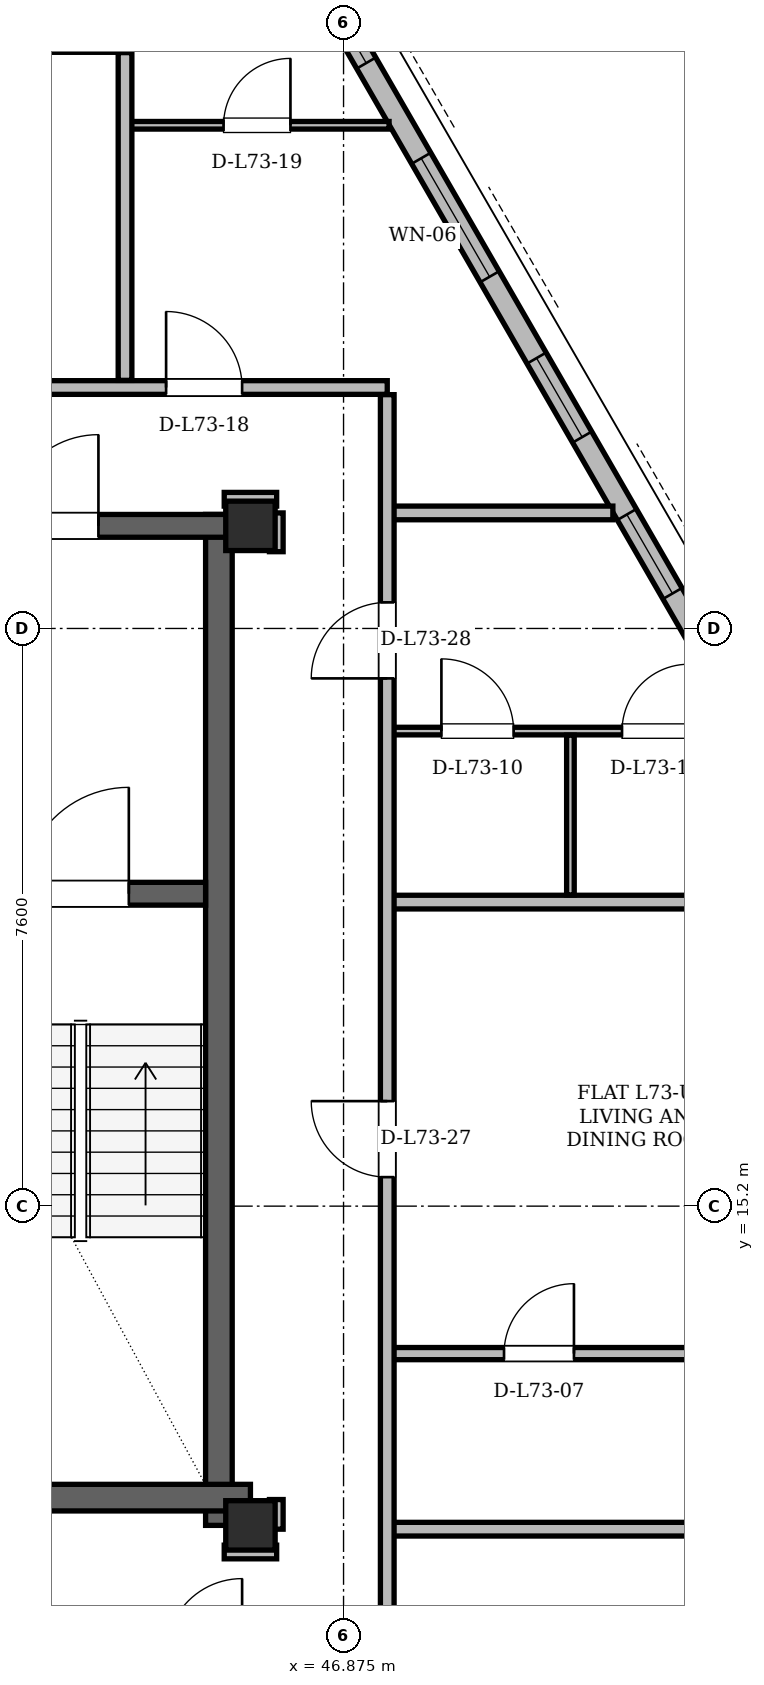
"""IFC4 building model, lengths in metres.
Left out: names, types, materials, properties, quantities, classifications, styles, units other than length and angle.
Written with IfcOpenShell. Run it as: python <this file> out.ifc"""

import sys

from ifc_helpers import new_model, si_unit, direction, frame, frame_2d, origin, origin_2d, place, context, subcontext, project, spatial, rectangle, hollow_rectangle, extrude, element, fill, save


model = new_model("IFC4")
c1 = context("Model", 3, precision=1e-05, world=origin(), true_north=direction((0.0, 1.0)))
c2 = subcontext(c1, "Body", "Model", "MODEL_VIEW")
j1 = project(units=[si_unit("LENGTHUNIT", "METRE"), si_unit("PLANEANGLEUNIT", "RADIAN")], contexts=[c1])
p1 = place(None, origin())
s1 = spatial("IfcSite", under=j1, at=p1, CompositionType="ELEMENT")
p2 = place(p1, origin())
s2 = spatial("IfcBuilding", under=s1, at=p2, CompositionType="ELEMENT")
p3 = place(p2, frame((0.0, 0.0, 277.2)))
s3 = spatial("IfcBuildingStorey", under=s2, at=p3, CompositionType="ELEMENT", Elevation=277.2)
for number, where, z_axis, x_axis in (
    (1, (45.65, 11.0, 0.0), (0.0, 0.0, 1.0), (1.0, 0.0, 0.0)),
    (2, (45.65, 24.15, 0.0), (0.0, 0.0, 1.0), (1.0, 0.0, 0.0)),
):
    element("IfcColumn", number, at=place(p3, frame(where, z_axis=z_axis, x_axis=x_axis)), inside=s3, PredefinedType="COLUMN", context=c2, shape_type="SweptSolid", body=[
        extrude(hollow_rectangle(XDim=0.65, YDim=0.65, WallThickness=0.05, at=origin_2d()), origin(), (0.0, 0.0, 1.0), 3.9),
    ])
p4 = place(p3, frame((45.235, 11.0, 0.0), z_axis=(0.0, 0.0, 1.0), x_axis=(0.0, 1.0, 0.0)))
e3 = element("IfcWall", 3, at=p4, inside=s3, PredefinedType="SHEAR", context=c2, shape_type="SweptSolid", body=[
    extrude(rectangle(XDim=13.3, YDim=0.35, at=frame_2d((6.65, 0.0))), origin(), (0.0, 0.0, 1.0), 3.68),
])
p5 = place(p3, frame((38.55, 11.365, 0.0), z_axis=(0.0, 0.0, 1.0), x_axis=(1.0, 0.0, 0.0)))
e4 = element("IfcWall", 4, at=p5, inside=s3, PredefinedType="SHEAR", context=c2, shape_type="SweptSolid", body=[
    extrude(rectangle(XDim=7.1, YDim=0.35, at=frame_2d((3.55, 0.0))), origin(), (0.0, 0.0, 1.0), 3.68),
])
p6 = place(p3, frame((29.65, 24.15, 0.0), z_axis=(0.0, 0.0, 1.0), x_axis=(1.0, 0.0, 0.0)))
e5 = element("IfcWall", 5, at=p6, inside=s3, PredefinedType="SHEAR", context=c2, shape_type="SweptSolid", body=[
    extrude(rectangle(XDim=15.7, YDim=0.3, at=frame_2d((7.85, 0.0))), origin(), (0.0, 0.0, 1.0), 3.68),
])
p7 = place(p6, frame((1.7, 0.0, 0.0)))
e6 = element("IfcOpeningElement", 6, at=p7, cuts=e5, PredefinedType="OPENING", context=c2, shape_type="SweptSolid", body=[
    extrude(rectangle(XDim=1.2, YDim=2.2, at=frame_2d((0.6, 1.1))), frame((0.0, 0.15, 0.0), z_axis=(0.0, -1.0, 0.0), x_axis=(1.0, 0.0, 0.0)), (0.0, 0.0, 1.0), 0.3),
])
p8 = place(p6, frame((12.8, 0.0, 0.0)))
e7 = element("IfcOpeningElement", 7, at=p8, cuts=e5, PredefinedType="OPENING", context=c2, shape_type="SweptSolid", body=[
    extrude(rectangle(XDim=1.2, YDim=2.2, at=frame_2d((0.6, 1.1))), frame((0.0, 0.15, 0.0), z_axis=(0.0, -1.0, 0.0), x_axis=(1.0, 0.0, 0.0)), (0.0, 0.0, 1.0), 0.3),
])
p9 = place(p6, frame((6.55, 0.0, 0.0)))
e8 = element("IfcOpeningElement", 8, at=p9, cuts=e5, PredefinedType="OPENING", context=c2, shape_type="SweptSolid", body=[
    extrude(rectangle(XDim=0.9, YDim=2.05, at=frame_2d((0.45, 1.025))), frame((0.0, 0.15, 0.0), z_axis=(0.0, -1.0, 0.0), x_axis=(1.0, 0.0, 0.0)), (0.0, 0.0, 1.0), 0.3),
])
p10 = place(p6, frame((8.45, 0.0, 0.0)))
e9 = element("IfcOpeningElement", 9, at=p10, cuts=e5, PredefinedType="OPENING", context=c2, shape_type="SweptSolid", body=[
    extrude(rectangle(XDim=0.9, YDim=2.05, at=frame_2d((0.45, 1.025))), frame((0.0, 0.15, 0.0), z_axis=(0.0, -1.0, 0.0), x_axis=(1.0, 0.0, 0.0)), (0.0, 0.0, 1.0), 0.3),
])
p11 = place(p3, frame((41.05, 19.31, 0.0), z_axis=(0.0, 0.0, 1.0), x_axis=(1.0, 0.0, 0.0)))
e10 = element("IfcWall", 10, at=p11, inside=s3, PredefinedType="SHEAR", context=c2, shape_type="SweptSolid", body=[
    extrude(rectangle(XDim=4.01, YDim=0.3, at=frame_2d((2.005, 0.0))), origin(), (0.0, 0.0, 1.0), 3.68),
])
p12 = place(p11, frame((1.6, 0.0, 0.0)))
e11 = element("IfcOpeningElement", 11, at=p12, cuts=e10, PredefinedType="OPENING", context=c2, shape_type="SweptSolid", body=[
    extrude(rectangle(XDim=1.4, YDim=2.2, at=frame_2d((0.7, 1.1))), frame((0.0, 0.15, 0.0), z_axis=(0.0, -1.0, 0.0), x_axis=(1.0, 0.0, 0.0)), (0.0, 0.0, 1.0), 0.3),
])
p13 = place(p3, frame((58.493, 10.633, 0.0), z_axis=(0.0, 0.0, 1.0), x_axis=(-0.499998095684, 0.866026503239, 0.0)))
e12 = element("IfcWall", 12, at=p13, inside=s3, PredefinedType="SOLIDWALL", context=c2, shape_type="SweptSolid", body=[
    extrude(rectangle(XDim=37.389, YDim=0.29, at=frame_2d((18.695, 0.0))), origin(), (0.0, 0.0, 1.0), 3.058),
])
p14 = place(p13, frame((8.034, 0.0, 0.0)))
e13 = element("IfcOpeningElement", 13, at=p14, cuts=e12, PredefinedType="OPENING", context=c2, shape_type="SweptSolid", body=[
    extrude(rectangle(XDim=1.5, YDim=2.2, at=frame_2d((0.75, 1.1))), frame((0.0, 0.145, 0.0), z_axis=(0.0, -1.0, 0.0), x_axis=(1.0, 0.0, 0.0)), (0.0, 0.0, 1.0), 0.29),
])
p15 = place(p13, frame((29.1, 0.0, 0.0)))
e14 = element("IfcOpeningElement", 14, at=p15, cuts=e12, PredefinedType="OPENING", context=c2, shape_type="SweptSolid", body=[
    extrude(rectangle(XDim=1.5, YDim=2.2, at=frame_2d((0.75, 1.1))), frame((0.0, 0.145, 0.0), z_axis=(0.0, -1.0, 0.0), x_axis=(1.0, 0.0, 0.0)), (0.0, 0.0, 1.0), 0.29),
])
p16 = place(p13, frame((3.531, 0.0, 0.85)))
e15 = element("IfcOpeningElement", 15, at=p16, cuts=e12, PredefinedType="OPENING", context=c2, shape_type="SweptSolid", body=[
    extrude(rectangle(XDim=1.2, YDim=1.48, at=frame_2d((0.6, 0.74))), frame((0.0, 0.145, 0.0), z_axis=(0.0, -1.0, 0.0), x_axis=(1.0, 0.0, 0.0)), (0.0, 0.0, 1.0), 0.29),
])
p17 = place(p13, frame((1.055, 0.0, 0.85)))
e16 = element("IfcOpeningElement", 16, at=p17, cuts=e12, PredefinedType="OPENING", context=c2, shape_type="SweptSolid", body=[
    extrude(rectangle(XDim=1.2, YDim=1.48, at=frame_2d((0.6, 0.74))), frame((0.0, 0.145, 0.0), z_axis=(0.0, -1.0, 0.0), x_axis=(1.0, 0.0, 0.0)), (0.0, 0.0, 1.0), 0.29),
])
p18 = place(p13, frame((35.336, 0.0, 0.85)))
e17 = element("IfcOpeningElement", 17, at=p18, cuts=e12, PredefinedType="OPENING", context=c2, shape_type="SweptSolid", body=[
    extrude(rectangle(XDim=1.2, YDim=1.48, at=frame_2d((0.6, 0.74))), frame((0.0, 0.145, 0.0), z_axis=(0.0, -1.0, 0.0), x_axis=(1.0, 0.0, 0.0)), (0.0, 0.0, 1.0), 0.29),
])
p19 = place(p13, frame((16.956, 0.0, 0.85)))
e18 = element("IfcOpeningElement", 18, at=p19, cuts=e12, PredefinedType="OPENING", context=c2, shape_type="SweptSolid", body=[
    extrude(rectangle(XDim=1.2, YDim=1.48, at=frame_2d((0.6, 0.74))), frame((0.0, 0.145, 0.0), z_axis=(0.0, -1.0, 0.0), x_axis=(1.0, 0.0, 0.0)), (0.0, 0.0, 1.0), 0.29),
])
p20 = place(p13, frame((19.392, 0.0, 0.85)))
e19 = element("IfcOpeningElement", 19, at=p20, cuts=e12, PredefinedType="OPENING", context=c2, shape_type="SweptSolid", body=[
    extrude(rectangle(XDim=1.8, YDim=1.75, at=frame_2d((0.9, 0.875))), frame((0.0, 0.145, 0.0), z_axis=(0.0, -1.0, 0.0), x_axis=(1.0, 0.0, 0.0)), (0.0, 0.0, 1.0), 0.29),
])
p21 = place(p13, frame((22.638, 0.0, 0.85)))
e20 = element("IfcOpeningElement", 20, at=p21, cuts=e12, PredefinedType="OPENING", context=c2, shape_type="SweptSolid", body=[
    extrude(rectangle(XDim=2.2, YDim=1.85, at=frame_2d((1.1, 0.925))), frame((0.0, 0.145, 0.0), z_axis=(0.0, -1.0, 0.0), x_axis=(1.0, 0.0, 0.0)), (0.0, 0.0, 1.0), 0.29),
])
p22 = place(p13, frame((14.58, 0.0, 0.85)))
e21 = element("IfcOpeningElement", 21, at=p22, cuts=e12, PredefinedType="OPENING", context=c2, shape_type="SweptSolid", body=[
    extrude(rectangle(XDim=1.2, YDim=1.48, at=frame_2d((0.6, 0.74))), frame((0.0, 0.145, 0.0), z_axis=(0.0, -1.0, 0.0), x_axis=(1.0, 0.0, 0.0)), (0.0, 0.0, 1.0), 0.29),
])
p23 = place(p3, frame((45.305, 10.65, 0.0), z_axis=(0.0, 0.0, 1.0), x_axis=(1.0, 0.0, 0.0)))
e22 = element("IfcWall", 22, at=p23, inside=s3, PredefinedType="PARTITIONING", context=c2, shape_type="SweptSolid", body=[
    extrude(rectangle(XDim=0.69, YDim=0.18, at=frame_2d((0.345, 0.0))), origin(), (0.0, 0.0, 1.0), 3.68),
])
p24 = place(p3, frame((47.45, 10.95, 0.0), z_axis=(0.0, 0.0, 1.0), x_axis=(1.0, 0.0, 0.0)))
e23 = element("IfcWall", 23, at=p24, inside=s3, PredefinedType="PARTITIONING", context=c2, shape_type="SweptSolid", body=[
    extrude(rectangle(XDim=10.688, YDim=0.18, at=frame_2d((5.344, 0.0))), origin(), (0.0, 0.0, 1.0), 3.266),
])
p25 = place(p3, frame((47.4, 13.26, 0.0), z_axis=(0.0, 0.0, 1.0), x_axis=(1.0, 0.0, 0.0)))
e24 = element("IfcWall", 24, at=p25, inside=s3, PredefinedType="PARTITIONING", context=c2, shape_type="SweptSolid", body=[
    extrude(rectangle(XDim=9.404, YDim=0.16, at=frame_2d((4.702, 0.0))), origin(), (0.0, 0.0, 1.0), 3.68),
])
p26 = place(p25, frame((1.586, 0.0, 0.0)))
e25 = element("IfcOpeningElement", 25, at=p26, cuts=e24, PredefinedType="OPENING", context=c2, shape_type="SweptSolid", body=[
    extrude(rectangle(XDim=0.92, YDim=2.12, at=frame_2d((0.46, 1.06))), frame((0.0, 0.08, 0.0), z_axis=(0.0, -1.0, 0.0), x_axis=(1.0, 0.0, 0.0)), (0.0, 0.0, 1.0), 0.16),
])
p27 = place(p25, frame((5.123, 0.0, 0.0)))
e26 = element("IfcOpeningElement", 26, at=p27, cuts=e24, PredefinedType="OPENING", context=c2, shape_type="SweptSolid", body=[
    extrude(rectangle(XDim=0.95, YDim=2.1, at=frame_2d((0.475, 1.05))), frame((0.0, 0.08, 0.0), z_axis=(0.0, -1.0, 0.0), x_axis=(1.0, 0.0, 0.0)), (0.0, 0.0, 1.0), 0.16),
])
p28 = place(p25, frame((7.838, 0.0, 0.0)))
e27 = element("IfcOpeningElement", 27, at=p28, cuts=e24, PredefinedType="OPENING", context=c2, shape_type="SweptSolid", body=[
    extrude(rectangle(XDim=0.88, YDim=2.08, at=frame_2d((0.44, 1.04))), frame((0.0, 0.08, 0.0), z_axis=(0.0, -1.0, 0.0), x_axis=(1.0, 0.0, 0.0)), (0.0, 0.0, 1.0), 0.16),
])
p29 = place(p3, frame((47.45, 19.2, 0.0), z_axis=(0.0, 0.0, 1.0), x_axis=(1.0, 0.0, 0.0)))
e28 = element("IfcWall", 28, at=p29, inside=s3, PredefinedType="PARTITIONING", context=c2, shape_type="SweptSolid", body=[
    extrude(rectangle(XDim=5.925, YDim=0.18, at=frame_2d((2.962, 0.0))), origin(), (0.0, 0.0, 1.0), 3.68),
])
p30 = place(p3, frame((47.4, 21.45, 0.0), z_axis=(0.0, 0.0, 1.0), x_axis=(1.0, 0.0, 0.0)))
e29 = element("IfcWall", 29, at=p30, inside=s3, PredefinedType="PARTITIONING", context=c2, shape_type="SweptSolid", body=[
    extrude(rectangle(XDim=4.676, YDim=0.1, at=frame_2d((2.338, 0.0))), origin(), (0.0, 0.0, 1.0), 3.68),
])
p31 = place(p30, frame((0.763, 0.0, 0.0)))
e30 = element("IfcOpeningElement", 30, at=p31, cuts=e29, PredefinedType="OPENING", context=c2, shape_type="SweptSolid", body=[
    extrude(rectangle(XDim=0.95, YDim=2.1, at=frame_2d((0.475, 1.05))), frame((0.0, 0.05, 0.0), z_axis=(0.0, -1.0, 0.0), x_axis=(1.0, 0.0, 0.0)), (0.0, 0.0, 1.0), 0.1),
])
p32 = place(p30, frame((3.139, 0.0, 0.0)))
e31 = element("IfcOpeningElement", 31, at=p32, cuts=e29, PredefinedType="OPENING", context=c2, shape_type="SweptSolid", body=[
    extrude(rectangle(XDim=0.88, YDim=2.08, at=frame_2d((0.44, 1.04))), frame((0.0, 0.05, 0.0), z_axis=(0.0, -1.0, 0.0), x_axis=(1.0, 0.0, 0.0)), (0.0, 0.0, 1.0), 0.1),
])
p33 = place(p3, frame((47.45, 24.32, 0.0), z_axis=(0.0, 0.0, 1.0), x_axis=(1.0, 0.0, 0.0)))
e32 = element("IfcWall", 32, at=p33, inside=s3, PredefinedType="PARTITIONING", context=c2, shape_type="SweptSolid", body=[
    extrude(rectangle(XDim=2.969, YDim=0.18, at=frame_2d((1.484, 0.0))), origin(), (0.0, 0.0, 1.0), 3.68),
])
p34 = place(p3, frame((45.305, 24.5, 0.0), z_axis=(0.0, 0.0, 1.0), x_axis=(1.0, 0.0, 0.0)))
e33 = element("IfcWall", 33, at=p34, inside=s3, PredefinedType="PARTITIONING", context=c2, shape_type="SweptSolid", body=[
    extrude(rectangle(XDim=0.69, YDim=0.18, at=frame_2d((0.345, 0.0))), origin(), (0.0, 0.0, 1.0), 3.266),
])
p35 = place(p3, frame((25.6, 25.97, 0.0), z_axis=(0.0, 0.0, 1.0), x_axis=(1.0, 0.0, 0.0)))
e34 = element("IfcWall", 34, at=p35, inside=s3, PredefinedType="PARTITIONING", context=c2, shape_type="SweptSolid", body=[
    extrude(rectangle(XDim=21.85, YDim=0.18, at=frame_2d((10.925, 0.0))), origin(), (0.0, 0.0, 1.0), 3.266),
])
p36 = place(p35, frame((7.454, 0.0, 0.0)))
e35 = element("IfcOpeningElement", 35, at=p36, cuts=e34, PredefinedType="OPENING", context=c2, shape_type="SweptSolid", body=[
    extrude(rectangle(XDim=1.0, YDim=2.18, at=frame_2d((0.5, 1.09))), frame((0.0, 0.09, 0.0), z_axis=(0.0, -1.0, 0.0), x_axis=(1.0, 0.0, 0.0)), (0.0, 0.0, 1.0), 0.18),
])
p37 = place(p35, frame((15.35, 0.0, 0.0)))
e36 = element("IfcOpeningElement", 36, at=p37, cuts=e34, PredefinedType="OPENING", context=c2, shape_type="SweptSolid", body=[
    extrude(rectangle(XDim=1.3, YDim=2.2, at=frame_2d((0.65, 1.1))), frame((0.0, 0.09, 0.0), z_axis=(0.0, -1.0, 0.0), x_axis=(1.0, 0.0, 0.0)), (0.0, 0.0, 1.0), 0.18),
])
p38 = place(p35, frame((18.94, 0.0, 0.0)))
e37 = element("IfcOpeningElement", 37, at=p38, cuts=e34, PredefinedType="OPENING", context=c2, shape_type="SweptSolid", body=[
    extrude(rectangle(XDim=1.0, YDim=2.18, at=frame_2d((0.5, 1.09))), frame((0.0, 0.09, 0.0), z_axis=(0.0, -1.0, 0.0), x_axis=(1.0, 0.0, 0.0)), (0.0, 0.0, 1.0), 0.18),
])
p39 = place(p3, frame((43.918, 29.42, 0.0), z_axis=(0.0, 0.0, 1.0), x_axis=(1.0, 0.0, 0.0)))
e38 = element("IfcWall", 38, at=p39, inside=s3, PredefinedType="PARTITIONING", context=c2, shape_type="SweptSolid", body=[
    extrude(rectangle(XDim=3.556, YDim=0.1, at=frame_2d((1.778, 0.0))), origin(), (0.0, 0.0, 1.0), 3.68),
])
p40 = place(p39, frame((1.378, 0.0, 0.0)))
e39 = element("IfcOpeningElement", 39, at=p40, cuts=e38, PredefinedType="OPENING", context=c2, shape_type="SweptSolid", body=[
    extrude(rectangle(XDim=0.88, YDim=2.08, at=frame_2d((0.44, 1.04))), frame((0.0, 0.05, 0.0), z_axis=(0.0, -1.0, 0.0), x_axis=(1.0, 0.0, 0.0)), (0.0, 0.0, 1.0), 0.1),
])
p41 = place(p3, frame((39.2, 30.47, 0.0), z_axis=(0.0, 0.0, 1.0), x_axis=(1.0, 0.0, 0.0)))
e40 = element("IfcWall", 40, at=p41, inside=s3, PredefinedType="PARTITIONING", context=c2, shape_type="SweptSolid", body=[
    extrude(rectangle(XDim=4.8, YDim=0.18, at=frame_2d((2.4, 0.0))), origin(), (0.0, 0.0, 1.0), 3.266),
])
p42 = place(p3, frame((44.0, 26.064, 0.0), z_axis=(0.0, 0.0, 1.0), x_axis=(0.0, 1.0, 0.0)))
e41 = element("IfcWall", 41, at=p42, inside=s3, PredefinedType="PARTITIONING", context=c2, shape_type="SweptSolid", body=[
    extrude(rectangle(XDim=4.312, YDim=0.18, at=frame_2d((2.156, 0.0))), origin(), (0.0, 0.0, 1.0), 3.266),
])
p43 = place(p3, frame((45.99, 10.95, 0.0), z_axis=(0.0, 0.0, 1.0), x_axis=(0.0, 1.0, 0.0)))
e42 = element("IfcWall", 42, at=p43, inside=s3, PredefinedType="PARTITIONING", context=c2, shape_type="SweptSolid", body=[
    extrude(rectangle(XDim=0.39, YDim=0.18, at=frame_2d((0.195, 0.0))), origin(), (0.0, 0.0, 1.0), 3.68),
])
p44 = place(p3, frame((45.99, 23.81, 0.0), z_axis=(0.0, 0.0, 1.0), x_axis=(0.0, 1.0, 0.0)))
e43 = element("IfcWall", 43, at=p44, inside=s3, PredefinedType="PARTITIONING", context=c2, shape_type="SweptSolid", body=[
    extrude(rectangle(XDim=0.51, YDim=0.18, at=frame_2d((0.255, 0.0))), origin(), (0.0, 0.0, 1.0), 3.68),
])
p45 = place(p3, frame((47.45, 9.394, 0.0), z_axis=(0.0, 0.0, 1.0), x_axis=(0.0, 1.0, 0.0)))
e44 = element("IfcWall", 44, at=p45, inside=s3, PredefinedType="PARTITIONING", context=c2, shape_type="SweptSolid", body=[
    extrude(rectangle(XDim=16.482, YDim=0.18, at=frame_2d((8.241, 0.0))), origin(), (0.0, 0.0, 1.0), 3.266),
])
p46 = place(p45, frame((6.188, 0.0, 0.0)))
e45 = element("IfcOpeningElement", 45, at=p46, cuts=e44, PredefinedType="OPENING", context=c2, shape_type="SweptSolid", body=[
    extrude(rectangle(XDim=1.0, YDim=2.18, at=frame_2d((0.5, 1.09))), frame((0.0, 0.09, 0.0), z_axis=(0.0, -1.0, 0.0), x_axis=(1.0, 0.0, 0.0)), (0.0, 0.0, 1.0), 0.18),
])
p47 = place(p45, frame((12.749, 0.0, 0.0)))
e46 = element("IfcOpeningElement", 46, at=p47, cuts=e44, PredefinedType="OPENING", context=c2, shape_type="SweptSolid", body=[
    extrude(rectangle(XDim=1.0, YDim=2.18, at=frame_2d((0.5, 1.09))), frame((0.0, 0.09, 0.0), z_axis=(0.0, -1.0, 0.0), x_axis=(1.0, 0.0, 0.0)), (0.0, 0.0, 1.0), 0.18),
])
p48 = place(p3, frame((49.86, 19.294, 0.0), z_axis=(0.0, 0.0, 1.0), x_axis=(0.0, 1.0, 0.0)))
e47 = element("IfcWall", 47, at=p48, inside=s3, PredefinedType="PARTITIONING", context=c2, shape_type="SweptSolid", body=[
    extrude(rectangle(XDim=2.102, YDim=0.1, at=frame_2d((1.051, 0.0))), origin(), (0.0, 0.0, 1.0), 3.68),
])
p49 = place(p19, origin())
e48 = element("IfcWindow", 48, at=p49, inside=s3, PartitioningType="SINGLE_PANEL", PredefinedType="WINDOW", context=c2, shape_type="SweptSolid", body=[
    extrude(rectangle(XDim=1.2, YDim=1.48, at=frame_2d((0.6, 0.74))), frame((0.0, 0.03, 0.0), z_axis=(0.0, -1.0, 0.0), x_axis=(1.0, 0.0, 0.0)), (0.0, 0.0, 1.0), 0.06),
])
fill(e18, e48)
p50 = place(p20, origin())
e49 = element("IfcWindow", 49, at=p50, inside=s3, PartitioningType="SINGLE_PANEL", PredefinedType="WINDOW", context=c2, shape_type="SweptSolid", body=[
    extrude(rectangle(XDim=1.8, YDim=1.75, at=frame_2d((0.9, 0.875))), frame((0.0, 0.03, 0.0), z_axis=(0.0, -1.0, 0.0), x_axis=(1.0, 0.0, 0.0)), (0.0, 0.0, 1.0), 0.06),
])
fill(e19, e49)
p51 = place(p21, origin())
e50 = element("IfcWindow", 50, at=p51, inside=s3, PartitioningType="SINGLE_PANEL", PredefinedType="WINDOW", context=c2, shape_type="SweptSolid", body=[
    extrude(rectangle(XDim=2.2, YDim=1.85, at=frame_2d((1.1, 0.925))), frame((0.0, 0.03, 0.0), z_axis=(0.0, -1.0, 0.0), x_axis=(1.0, 0.0, 0.0)), (0.0, 0.0, 1.0), 0.06),
])
fill(e20, e50)
p52 = place(p22, origin())
e51 = element("IfcWindow", 51, at=p52, inside=s3, PartitioningType="SINGLE_PANEL", PredefinedType="WINDOW", context=c2, shape_type="SweptSolid", body=[
    extrude(rectangle(XDim=1.2, YDim=1.48, at=frame_2d((0.6, 0.74))), frame((0.0, 0.03, 0.0), z_axis=(0.0, -1.0, 0.0), x_axis=(1.0, 0.0, 0.0)), (0.0, 0.0, 1.0), 0.06),
])
fill(e21, e51)
p53 = place(p12, origin())
e52 = element("IfcDoor", 52, at=p53, inside=s3, OperationType="SINGLE_SWING_RIGHT", PredefinedType="DOOR", context=c2, shape_type="SweptSolid", body=[
    extrude(rectangle(XDim=1.4, YDim=2.2, at=frame_2d((0.7, 1.1))), frame((0.0, 0.025, 0.0), z_axis=(0.0, -1.0, 0.0), x_axis=(1.0, 0.0, 0.0)), (0.0, 0.0, 1.0), 0.05),
])
fill(e11, e52)
p54 = place(p8, origin())
e53 = element("IfcDoor", 53, at=p54, inside=s3, OperationType="SINGLE_SWING_RIGHT", PredefinedType="DOOR", context=c2, shape_type="SweptSolid", body=[
    extrude(rectangle(XDim=1.2, YDim=2.2, at=frame_2d((0.6, 1.1))), frame((0.0, 0.025, 0.0), z_axis=(0.0, -1.0, 0.0), x_axis=(1.0, 0.0, 0.0)), (0.0, 0.0, 1.0), 0.05),
])
fill(e7, e53)
p55 = place(p26, origin())
e54 = element("IfcDoor", 54, at=p55, inside=s3, OperationType="SINGLE_SWING_RIGHT", PredefinedType="DOOR", context=c2, shape_type="SweptSolid", body=[
    extrude(rectangle(XDim=0.92, YDim=2.12, at=frame_2d((0.46, 1.06))), frame((0.0, 0.025, 0.0), z_axis=(0.0, -1.0, 0.0), x_axis=(1.0, 0.0, 0.0)), (0.0, 0.0, 1.0), 0.05),
])
fill(e25, e54)
p56 = place(p31, origin())
e55 = element("IfcDoor", 55, at=p56, inside=s3, OperationType="SINGLE_SWING_LEFT", PredefinedType="DOOR", context=c2, shape_type="SweptSolid", body=[
    extrude(rectangle(XDim=0.95, YDim=2.1, at=frame_2d((0.475, 1.05))), frame((0.0, 0.025, 0.0), z_axis=(0.0, -1.0, 0.0), x_axis=(1.0, 0.0, 0.0)), (0.0, 0.0, 1.0), 0.05),
])
fill(e30, e55)
p57 = place(p32, origin())
e56 = element("IfcDoor", 56, at=p57, inside=s3, OperationType="SINGLE_SWING_RIGHT", PredefinedType="DOOR", context=c2, shape_type="SweptSolid", body=[
    extrude(rectangle(XDim=0.88, YDim=2.08, at=frame_2d((0.44, 1.04))), frame((0.0, 0.025, 0.0), z_axis=(0.0, -1.0, 0.0), x_axis=(1.0, 0.0, 0.0)), (0.0, 0.0, 1.0), 0.05),
])
fill(e31, e56)
p58 = place(p38, origin())
e57 = element("IfcDoor", 57, at=p58, inside=s3, OperationType="SINGLE_SWING_LEFT", PredefinedType="DOOR", context=c2, shape_type="SweptSolid", body=[
    extrude(rectangle(XDim=1.0, YDim=2.18, at=frame_2d((0.5, 1.09))), frame((0.0, 0.025, 0.0), z_axis=(0.0, -1.0, 0.0), x_axis=(1.0, 0.0, 0.0)), (0.0, 0.0, 1.0), 0.05),
])
fill(e37, e57)
p59 = place(p40, origin())
e58 = element("IfcDoor", 58, at=p59, inside=s3, OperationType="SINGLE_SWING_RIGHT", PredefinedType="DOOR", context=c2, shape_type="SweptSolid", body=[
    extrude(rectangle(XDim=0.88, YDim=2.08, at=frame_2d((0.44, 1.04))), frame((0.0, 0.025, 0.0), z_axis=(0.0, -1.0, 0.0), x_axis=(1.0, 0.0, 0.0)), (0.0, 0.0, 1.0), 0.05),
])
fill(e39, e58)
p60 = place(p46, origin())
e59 = element("IfcDoor", 59, at=p60, inside=s3, OperationType="SINGLE_SWING_RIGHT", PredefinedType="DOOR", context=c2, shape_type="SweptSolid", body=[
    extrude(rectangle(XDim=1.0, YDim=2.18, at=frame_2d((0.5, 1.09))), frame((0.0, 0.025, 0.0), z_axis=(0.0, -1.0, 0.0), x_axis=(1.0, 0.0, 0.0)), (0.0, 0.0, 1.0), 0.05),
])
fill(e45, e59)
p61 = place(p47, origin())
e60 = element("IfcDoor", 60, at=p61, inside=s3, OperationType="SINGLE_SWING_LEFT", PredefinedType="DOOR", context=c2, shape_type="SweptSolid", body=[
    extrude(rectangle(XDim=1.0, YDim=2.18, at=frame_2d((0.5, 1.09))), frame((0.0, 0.025, 0.0), z_axis=(0.0, -1.0, 0.0), x_axis=(1.0, 0.0, 0.0)), (0.0, 0.0, 1.0), 0.05),
])
fill(e46, e60)
save(model, sys.argv[1])
